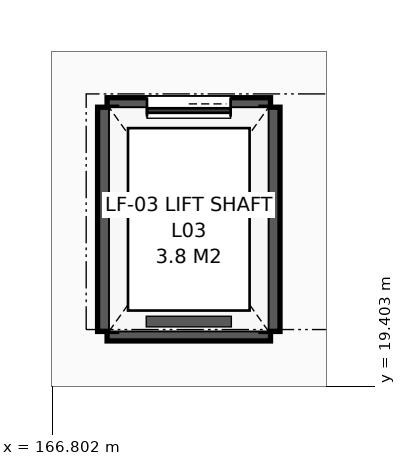
"""IFC4 building model, lengths in metres.
Left out: names, types, materials, properties, quantities, classifications, styles, units other than length and angle.
Written with IfcOpenShell. Run it as: python <this file> out.ifc"""

import sys

from ifc_helpers import new_model, si_unit, direction, frame, frame_2d, origin, place, context, subcontext, project, spatial, rectangle, extrude, element, fill, save


model = new_model("IFC4")
c1 = context("Model", 3, precision=1e-05, world=origin(), true_north=direction((0.0, 1.0)))
c2 = subcontext(c1, "Body", "Model", "MODEL_VIEW")
j1 = project(units=[si_unit("LENGTHUNIT", "METRE"), si_unit("PLANEANGLEUNIT", "RADIAN")], contexts=[c1])
p1 = place(None, origin())
s1 = spatial("IfcSite", under=j1, at=p1, CompositionType="ELEMENT")
p2 = place(p1, origin())
s2 = spatial("IfcBuilding", under=s1, at=p2, CompositionType="ELEMENT")
p3 = place(p2, frame((0.0, 0.0, 13.2)))
s3 = spatial("IfcBuildingStorey", under=s2, at=p3, CompositionType="ELEMENT", Elevation=13.2)
p4 = place(p3, frame((167.525, 20.125, 0.0), z_axis=(0.0, 0.0, 1.0), x_axis=(1.0, 0.0, 0.0)))
e1 = element("IfcWall", 1, at=p4, inside=s3, PredefinedType="SHEAR", context=c2, shape_type="SweptSolid", body=[
    extrude(rectangle(XDim=2.15, YDim=0.25, at=frame_2d((1.075, 0.0))), origin(), (0.0, 0.0, 1.0), 3.55),
])
p5 = place(p3, frame((169.675, 23.075, 0.0), z_axis=(0.0, 0.0, 1.0), x_axis=(-1.0, 0.0, 0.0)))
e2 = element("IfcWall", 2, at=p5, inside=s3, PredefinedType="SHEAR", context=c2, shape_type="SweptSolid", body=[
    extrude(rectangle(XDim=2.15, YDim=0.25, at=frame_2d((1.075, 0.0))), origin(), (0.0, 0.0, 1.0), 3.55),
])
p6 = place(p5, frame((0.525, 0.0, 0.0)))
e3 = element("IfcOpeningElement", 3, at=p6, cuts=e2, PredefinedType="OPENING", context=c2, shape_type="SweptSolid", body=[
    extrude(rectangle(XDim=1.1, YDim=2.15, at=frame_2d((0.55, 1.075))), frame((0.0, 0.135, 0.0), z_axis=(0.0, -1.0, 0.0), x_axis=(1.0, 0.0, 0.0)), (0.0, 0.0, 1.0), 0.27),
])
for number, where, z_axis, x_axis in (
    (4, (167.525, 23.075, 0.0), (0.0, 0.0, 1.0), (0.0, -1.0, 0.0)),
    (5, (169.675, 20.125, 0.0), (0.0, 0.0, 1.0), (0.0, 1.0, 0.0)),
):
    element("IfcWall", number, at=place(p3, frame(where, z_axis=z_axis, x_axis=x_axis)), inside=s3, PredefinedType="SHEAR", context=c2, shape_type="SweptSolid", body=[
        extrude(rectangle(XDim=2.95, YDim=0.25, at=frame_2d((1.475, 0.0))), origin(), (0.0, 0.0, 1.0), 3.55),
    ])
p7 = place(p6, origin())
e6 = element("IfcDoor", 6, at=p7, inside=s3, OperationType="SLIDING_TO_LEFT", PredefinedType="DOOR", context=c2, shape_type="SweptSolid", body=[
    extrude(rectangle(XDim=1.1, YDim=2.15, at=frame_2d((0.55, 1.075))), frame((0.0, 0.025, 0.0), z_axis=(0.0, -1.0, 0.0), x_axis=(1.0, 0.0, 0.0)), (0.0, 0.0, 1.0), 0.05),
])
fill(e3, e6)
save(model, sys.argv[1])
